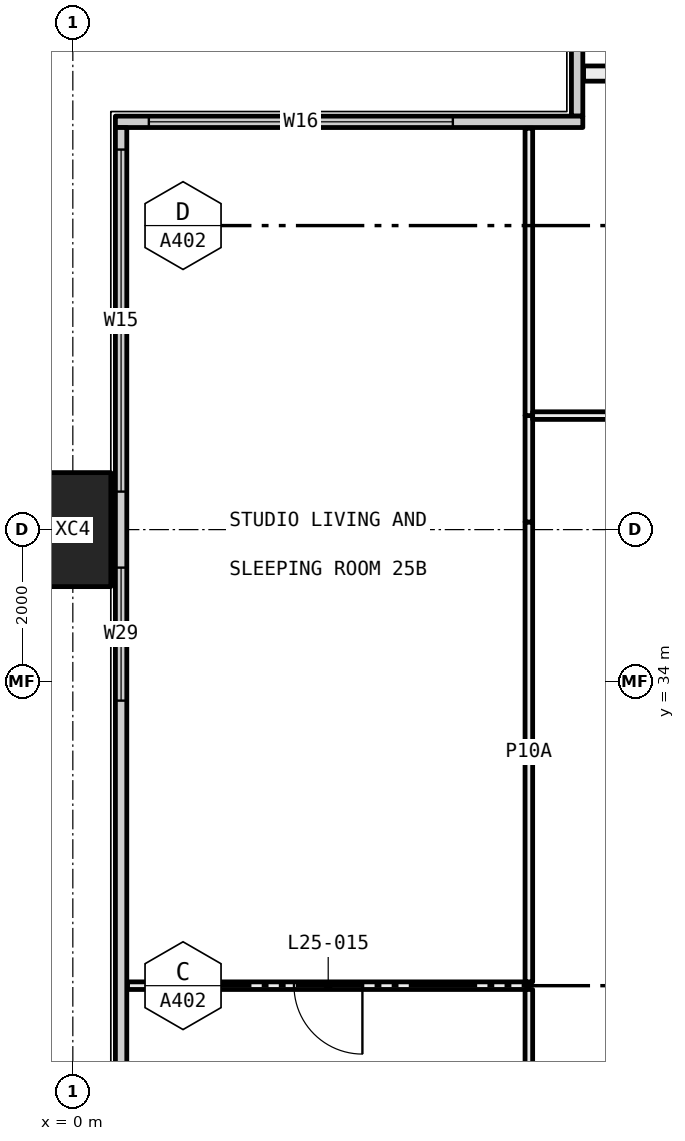
"""IFC4 building model, lengths in metres.
Left out: names, types, materials, properties, quantities, classifications, styles, units other than length and angle.
Written with IfcOpenShell. Run it as: python <this file> out.ifc"""

import sys

from ifc_helpers import new_model, si_unit, direction, frame, frame_2d, origin, origin_2d, place, context, subcontext, project, spatial, rectangle, hollow_rectangle, extrude, element, fill, save


model = new_model("IFC4")
c1 = context("Model", 3, precision=1e-05, world=origin(), true_north=direction((0.0, 1.0)))
c2 = subcontext(c1, "Body", "Model", "MODEL_VIEW")
j1 = project(units=[si_unit("LENGTHUNIT", "METRE"), si_unit("PLANEANGLEUNIT", "RADIAN")], contexts=[c1])
p1 = place(None, origin())
s1 = spatial("IfcSite", under=j1, at=p1, CompositionType="ELEMENT")
p2 = place(p1, origin())
s2 = spatial("IfcBuilding", under=s1, at=p2, CompositionType="ELEMENT")
p3 = place(p2, frame((0.0, 0.0, 100.05)))
s3 = spatial("IfcBuildingStorey", under=s2, at=p3, CompositionType="ELEMENT", Elevation=100.05)
p4 = place(p3, frame((0.0, 36.0, -0.4), z_axis=(0.0, 0.0, 1.0), x_axis=(0.0, 1.0, 0.0)))
e1 = element("IfcColumn", 1, at=p4, inside=s3, PredefinedType="COLUMN", context=c2, shape_type="SweptSolid", body=[
    extrude(hollow_rectangle(XDim=1.5, YDim=1.0, WallThickness=0.06, at=origin_2d()), origin(), (0.0, 0.0, 1.0), 3.45),
])
p5 = place(p3, frame((6.635, 41.44, 0.0), z_axis=(0.0, 0.0, 1.0), x_axis=(0.0, 1.0, 0.0)))
e2 = element("IfcWall", 2, at=p5, inside=s3, PredefinedType="ELEMENTEDWALL", context=c2, shape_type="SweptSolid", body=[
    extrude(rectangle(XDim=5.85, YDim=0.15, at=frame_2d((2.925, 0.0))), origin(), (0.0, 0.0, 1.0), 3.05),
])
p6 = place(p5, frame((1.56, 0.0, 0.45)))
e3 = element("IfcOpeningElement", 3, at=p6, cuts=e2, PredefinedType="OPENING", context=c2, shape_type="SweptSolid", body=[
    extrude(rectangle(XDim=4.0, YDim=2.55, at=frame_2d((2.0, 1.275))), frame((0.0, 0.085, 0.0), z_axis=(0.0, -1.0, 0.0), x_axis=(1.0, 0.0, 0.0)), (0.0, 0.0, 1.0), 0.17),
])
p7 = place(p3, frame((0.56, 41.365, 0.0), z_axis=(0.0, 0.0, 1.0), x_axis=(1.0, 0.0, 0.0)))
e4 = element("IfcWall", 4, at=p7, inside=s3, PredefinedType="ELEMENTEDWALL", context=c2, shape_type="SweptSolid", body=[
    extrude(rectangle(XDim=6.15, YDim=0.15, at=frame_2d((3.075, 0.0))), origin(), (0.0, 0.0, 1.0), 3.05),
])
p8 = place(p7, frame((0.44, 0.0, 0.45)))
e5 = element("IfcOpeningElement", 5, at=p8, cuts=e4, PredefinedType="OPENING", context=c2, shape_type="SweptSolid", body=[
    extrude(rectangle(XDim=4.0, YDim=2.55, at=frame_2d((2.0, 1.275))), frame((0.0, 0.085, 0.0), z_axis=(0.0, -1.0, 0.0), x_axis=(1.0, 0.0, 0.0)), (0.0, 0.0, 1.0), 0.17),
])
p9 = place(p3, frame((0.635, 18.71, 0.0), z_axis=(0.0, 0.0, 1.0), x_axis=(0.0, 1.0, 0.0)))
e6 = element("IfcWall", 6, at=p9, inside=s3, PredefinedType="ELEMENTEDWALL", context=c2, shape_type="SweptSolid", body=[
    extrude(rectangle(XDim=22.58, YDim=0.15, at=frame_2d((11.29, 0.0))), origin(), (0.0, 0.0, 1.0), 3.05),
])
p10 = place(p9, frame((0.29, 0.0, 0.45)))
e7 = element("IfcOpeningElement", 7, at=p10, cuts=e6, PredefinedType="OPENING", context=c2, shape_type="SweptSolid", body=[
    extrude(rectangle(XDim=4.5, YDim=2.55, at=frame_2d((2.25, 1.275))), frame((0.0, 0.085, 0.0), z_axis=(0.0, -1.0, 0.0), x_axis=(1.0, 0.0, 0.0)), (0.0, 0.0, 1.0), 0.17),
])
p11 = place(p9, frame((5.79, 0.0, 0.45)))
e8 = element("IfcOpeningElement", 8, at=p11, cuts=e6, PredefinedType="OPENING", context=c2, shape_type="SweptSolid", body=[
    extrude(rectangle(XDim=1.75, YDim=2.55, at=frame_2d((0.875, 1.275))), frame((0.0, 0.085, 0.0), z_axis=(0.0, -1.0, 0.0), x_axis=(1.0, 0.0, 0.0)), (0.0, 0.0, 1.0), 0.17),
])
p12 = place(p9, frame((15.04, 0.0, 0.45)))
e9 = element("IfcOpeningElement", 9, at=p12, cuts=e6, PredefinedType="OPENING", context=c2, shape_type="SweptSolid", body=[
    extrude(rectangle(XDim=1.75, YDim=2.55, at=frame_2d((0.875, 1.275))), frame((0.0, 0.085, 0.0), z_axis=(0.0, -1.0, 0.0), x_axis=(1.0, 0.0, 0.0)), (0.0, 0.0, 1.0), 0.17),
])
p13 = place(p9, frame((17.79, 0.0, 0.45)))
e10 = element("IfcOpeningElement", 10, at=p13, cuts=e6, PredefinedType="OPENING", context=c2, shape_type="SweptSolid", body=[
    extrude(rectangle(XDim=4.5, YDim=2.55, at=frame_2d((2.25, 1.275))), frame((0.0, 0.085, 0.0), z_axis=(0.0, -1.0, 0.0), x_axis=(1.0, 0.0, 0.0)), (0.0, 0.0, 1.0), 0.17),
])
p14 = place(p3, frame((6.0, 30.0, 0.0), z_axis=(0.0, 0.0, 1.0), x_axis=(-1.0, 0.0, 0.0)))
e11 = element("IfcWall", 11, at=p14, inside=s3, PredefinedType="PARTITIONING", context=c2, shape_type="SweptSolid", body=[
    extrude(rectangle(XDim=5.28, YDim=0.1, at=frame_2d((2.64, 0.0))), origin(), (0.0, 0.0, 1.0), 3.05),
])
p15 = place(p14, frame((2.19, 0.0, 0.0)))
e12 = element("IfcOpeningElement", 12, at=p15, cuts=e11, PredefinedType="OPENING", context=c2, shape_type="SweptSolid", body=[
    extrude(rectangle(XDim=0.9, YDim=2.1, at=frame_2d((0.45, 1.05))), frame((0.0, 0.06, 0.0), z_axis=(0.0, -1.0, 0.0), x_axis=(1.0, 0.0, 0.0)), (0.0, 0.0, 1.0), 0.12),
])
p16 = place(p3, frame((6.0, 27.0, 0.0), z_axis=(0.0, 0.0, 1.0), x_axis=(0.0, 1.0, 0.0)))
e13 = element("IfcWall", 13, at=p16, inside=s3, PredefinedType="PARTITIONING", context=c2, shape_type="SweptSolid", body=[
    extrude(rectangle(XDim=2.95, YDim=0.1, at=frame_2d((1.475, 0.0))), origin(), (0.0, 0.0, 1.0), 3.05),
])
p17 = place(p3, frame((6.0, 30.05, 0.0), z_axis=(0.0, 0.0, 1.0), x_axis=(0.0, 1.0, 0.0)))
e14 = element("IfcWall", 14, at=p17, inside=s3, PredefinedType="PARTITIONING", context=c2, shape_type="SweptSolid", body=[
    extrude(rectangle(XDim=6.05, YDim=0.1, at=frame_2d((3.025, 0.0))), origin(), (0.0, 0.0, 1.0), 2.45),
])
p18 = place(p3, frame((6.0, 36.1, 0.0), z_axis=(0.0, 0.0, 1.0), x_axis=(0.0, 1.0, 0.0)))
e15 = element("IfcWall", 15, at=p18, inside=s3, PredefinedType="PARTITIONING", context=c2, shape_type="SweptSolid", body=[
    extrude(rectangle(XDim=1.4, YDim=0.1, at=frame_2d((0.7, 0.0))), origin(), (0.0, 0.0, 1.0), 3.05),
])
p19 = place(p3, frame((6.0, 37.5, 0.0), z_axis=(0.0, 0.0, 1.0), x_axis=(0.0, 1.0, 0.0)))
e16 = element("IfcWall", 16, at=p19, inside=s3, PredefinedType="PARTITIONING", context=c2, shape_type="SweptSolid", body=[
    extrude(rectangle(XDim=3.78, YDim=0.1, at=frame_2d((1.89, 0.0))), origin(), (0.0, 0.0, 1.0), 3.05),
])
p20 = place(p3, frame((10.0, 37.5, 0.0), z_axis=(0.0, 0.0, 1.0), x_axis=(-1.0, 0.0, 0.0)))
e17 = element("IfcWall", 17, at=p20, inside=s3, PredefinedType="PARTITIONING", context=c2, shape_type="SweptSolid", body=[
    extrude(rectangle(XDim=3.95, YDim=0.1, at=frame_2d((1.975, 0.0))), origin(), (0.0, 0.0, 1.0), 3.05),
])
p21 = place(p20, frame((1.525, 0.0, 0.0)))
e18 = element("IfcOpeningElement", 18, at=p21, cuts=e17, PredefinedType="OPENING", context=c2, shape_type="SweptSolid", body=[
    extrude(rectangle(XDim=0.9, YDim=2.1, at=frame_2d((0.45, 1.05))), frame((0.0, 0.06, 0.0), z_axis=(0.0, -1.0, 0.0), x_axis=(1.0, 0.0, 0.0)), (0.0, 0.0, 1.0), 0.12),
])
p22 = place(p3, frame((10.1, 42.0, 0.0), z_axis=(0.0, 0.0, 1.0), x_axis=(-1.0, 0.0, 0.0)))
e19 = element("IfcWall", 19, at=p22, inside=s3, PredefinedType="PARTITIONING", context=c2, shape_type="SweptSolid", body=[
    extrude(rectangle(XDim=3.38, YDim=0.2, at=frame_2d((1.69, 0.0))), origin(), (0.0, 0.0, 1.0), 3.05),
])
p23 = place(p8, origin())
e20 = element("IfcWindow", 20, at=p23, inside=s3, PartitioningType="SINGLE_PANEL", PredefinedType="WINDOW", context=c2, shape_type="SweptSolid", body=[
    extrude(rectangle(XDim=4.0, YDim=2.55, at=frame_2d((2.0, 1.275))), frame((0.0, 0.03, 0.0), z_axis=(0.0, -1.0, 0.0), x_axis=(1.0, 0.0, 0.0)), (0.0, 0.0, 1.0), 0.06),
])
fill(e5, e20)
p24 = place(p12, origin())
e21 = element("IfcWindow", 21, at=p24, inside=s3, PartitioningType="SINGLE_PANEL", PredefinedType="WINDOW", context=c2, shape_type="SweptSolid", body=[
    extrude(rectangle(XDim=1.75, YDim=2.55, at=frame_2d((0.875, 1.275))), frame((0.0, 0.03, 0.0), z_axis=(0.0, -1.0, 0.0), x_axis=(1.0, 0.0, 0.0)), (0.0, 0.0, 1.0), 0.06),
])
fill(e9, e21)
p25 = place(p13, origin())
e22 = element("IfcWindow", 22, at=p25, inside=s3, PartitioningType="SINGLE_PANEL", PredefinedType="WINDOW", context=c2, shape_type="SweptSolid", body=[
    extrude(rectangle(XDim=4.5, YDim=2.55, at=frame_2d((2.25, 1.275))), frame((0.0, 0.03, 0.0), z_axis=(0.0, -1.0, 0.0), x_axis=(1.0, 0.0, 0.0)), (0.0, 0.0, 1.0), 0.06),
])
fill(e10, e22)
p26 = place(p15, origin())
e23 = element("IfcDoor", 23, at=p26, inside=s3, OperationType="SINGLE_SWING_RIGHT", PredefinedType="DOOR", context=c2, shape_type="SweptSolid", body=[
    extrude(rectangle(XDim=0.9, YDim=2.1, at=frame_2d((0.45, 1.05))), frame((0.0, 0.025, 0.0), z_axis=(0.0, -1.0, 0.0), x_axis=(1.0, 0.0, 0.0)), (0.0, 0.0, 1.0), 0.05),
])
fill(e12, e23)
save(model, sys.argv[1])
